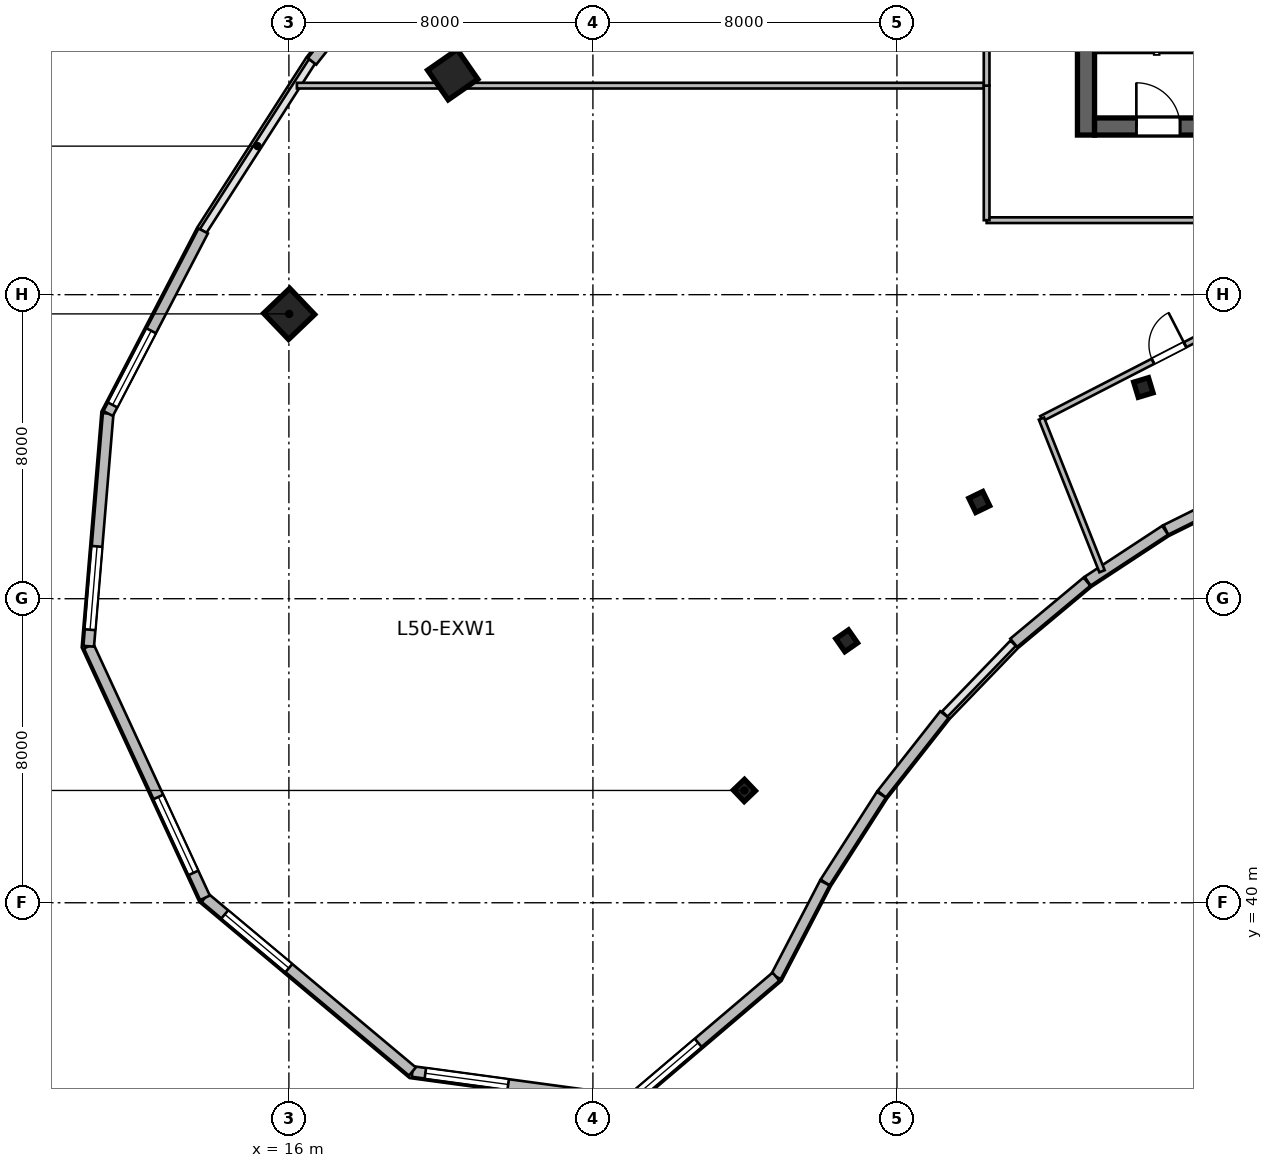
"""IFC4 building model, lengths in metres.
Left out: names, types, materials, properties, quantities, classifications, styles, units other than length and angle.
Written with IfcOpenShell. Run it as: python <this file> out.ifc"""

import sys

from ifc_helpers import new_model, si_unit, direction, frame, frame_2d, origin, origin_2d, place, context, subcontext, project, spatial, rectangle, i_section, extrude, source, transform, mapped, element, fill, save


model = new_model("IFC4")
c1 = context("Model", 3, precision=1e-05, world=origin(), true_north=direction((0.0, 1.0)))
c2 = subcontext(c1, "Body", "Model", "MODEL_VIEW")
j1 = project(units=[si_unit("LENGTHUNIT", "METRE"), si_unit("PLANEANGLEUNIT", "RADIAN")], contexts=[c1])
p1 = place(None, origin())
s1 = spatial("IfcSite", under=j1, at=p1, CompositionType="ELEMENT")
p2 = place(p1, origin())
s2 = spatial("IfcBuilding", under=s1, at=p2, CompositionType="ELEMENT")
p3 = place(p2, frame((0.0, 0.0, 207.9)))
s3 = spatial("IfcBuildingStorey", under=s2, at=p3, CompositionType="ELEMENT", Elevation=207.9)
m1 = source(origin(), c2, "Body", "SweptSolid", [
    extrude(rectangle(XDim=12.0, YDim=0.45, at=frame_2d((6.0, 0.0))), origin(), (0.0, 0.0, 1.0), 3.9),
])
p4 = place(p3, frame((36.975, 60.2, 0.0), z_axis=(0.0, 0.0, 1.0), x_axis=(0.0, 1.0, 0.0)))
e1 = element("IfcWall", 1, at=p4, inside=s3, PredefinedType="SHEAR", context=c2, shape_type="MappedRepresentation", body=[
    mapped(m1, transform((0.0, 0.0, 0.0), scale=1.0)),
])
m2 = source(origin(), c2, "Body", "SweptSolid", [
    extrude(rectangle(XDim=21.6, YDim=0.45, at=frame_2d((10.8, 0.0))), origin(), (0.0, 0.0, 1.0), 3.9),
])
p5 = place(p3, frame((37.2, 60.425, 0.0), z_axis=(0.0, 0.0, 1.0), x_axis=(1.0, 0.0, 0.0)))
e2 = element("IfcWall", 2, at=p5, inside=s3, PredefinedType="SHEAR", context=c2, shape_type="MappedRepresentation", body=[
    mapped(m2, transform((0.0, 0.0, 0.0), scale=1.0)),
])
p6 = place(p5, frame((1.1, 0.0, 0.0)))
e3 = element("IfcOpeningElement", 3, at=p6, cuts=e2, PredefinedType="OPENING", context=c2, shape_type="SweptSolid", body=[
    extrude(rectangle(XDim=1.15, YDim=2.15, at=frame_2d((0.575, 1.075))), frame((0.0, 0.235, 0.0), z_axis=(0.0, -1.0, 0.0), x_axis=(1.0, 0.0, 0.0)), (0.0, 0.0, 1.0), 0.47),
])
p7 = place(p5, frame((19.5, 0.0, 0.0)))
e4 = element("IfcOpeningElement", 4, at=p7, cuts=e2, PredefinedType="OPENING", context=c2, shape_type="SweptSolid", body=[
    extrude(rectangle(XDim=0.9, YDim=2.1, at=frame_2d((0.45, 1.05))), frame((0.0, 0.235, 0.0), z_axis=(0.0, -1.0, 0.0), x_axis=(1.0, 0.0, 0.0)), (0.0, 0.0, 1.0), 0.47),
])
p8 = place(p5, frame((12.02, 0.0, 0.0)))
e5 = element("IfcOpeningElement", 5, at=p8, cuts=e2, PredefinedType="OPENING", context=c2, shape_type="SweptSolid", body=[
    extrude(rectangle(XDim=1.6, YDim=2.15, at=frame_2d((0.8, 1.075))), frame((0.0, 0.235, 0.0), z_axis=(0.0, -1.0, 0.0), x_axis=(1.0, 0.0, 0.0)), (0.0, 0.0, 1.0), 0.47),
])
m3 = source(origin(), c2, "Body", "SweptSolid", [
    extrude(i_section(OverallWidth=0.406, OverallDepth=0.416, WebThickness=0.03, FlangeThickness=0.048, at=origin_2d()), origin(), (0.0, 0.0, 1.0), 3.9),
])
p9 = place(p3, frame((27.985, 42.955, 0.0), z_axis=(0.0, 0.0, 1.0), x_axis=(-0.690756218984, 0.723087716626, 0.0)))
e6 = element("IfcColumn", 6, at=p9, inside=s3, PredefinedType="COLUMN", context=c2, shape_type="MappedRepresentation", body=[
    mapped(m3, transform((0.0, 0.0, 0.0), scale=1.0)),
])
m4 = source(origin(), c2, "Body", "SweptSolid", [
    extrude(rectangle(XDim=0.95, YDim=0.95, at=origin_2d()), origin(), (0.0, 0.0, 1.0), 3.9),
])
p10 = place(p3, frame((16.007, 55.494, 0.0), z_axis=(0.0, 0.0, 1.0), x_axis=(-0.690756218984, 0.723087716626, 0.0)))
e7 = element("IfcColumn", 7, at=p10, inside=s3, PredefinedType="COLUMN", context=c2, shape_type="MappedRepresentation", body=[
    mapped(m4, transform((0.0, 0.0, 0.0), scale=1.0)),
])
p11 = place(p3, frame((30.677, 46.892, 0.0), z_axis=(0.0, 0.0, 1.0), x_axis=(-0.571143442153, 0.820850271661, 0.0)))
e8 = element("IfcColumn", 8, at=p11, inside=s3, PredefinedType="COLUMN", context=c2, shape_type="MappedRepresentation", body=[
    mapped(m3, transform((0.0, 0.0, 0.0), scale=1.0)),
])
p12 = place(p3, frame((20.311, 61.789, 0.0), z_axis=(0.0, 0.0, 1.0), x_axis=(-0.571143442153, 0.820850271661, 0.0)))
e9 = element("IfcColumn", 9, at=p12, inside=s3, PredefinedType="COLUMN", context=c2, shape_type="MappedRepresentation", body=[
    mapped(m4, transform((0.0, 0.0, 0.0), scale=1.0)),
])
for number, where, z_axis, x_axis in (
    (10, (34.166, 50.545, 0.0), (0.0, 0.0, 1.0), (-0.436, 0.9, 0.0)),
    (11, (38.485, 53.558, 0.0), (0.0, 0.0, 1.0), (-0.289, 0.957, 0.0)),
):
    element("IfcColumn", number, at=place(p3, frame(where, z_axis=z_axis, x_axis=x_axis)), inside=s3, PredefinedType="COLUMN", context=c2, shape_type="MappedRepresentation", body=[
        mapped(m3, transform((0.0, 0.0, 0.0), scale=1.0)),
    ])
m5 = source(origin(), c2, "Body", "SweptSolid", [
    extrude(rectangle(XDim=2.378, YDim=0.28, at=frame_2d((1.189, 0.0))), origin(), (0.0, 0.0, 1.0), 3.64),
])
p13 = place(p3, frame((41.207, 50.868, 0.0), z_axis=(0.0, 0.0, 1.0), x_axis=(-0.895941616831, -0.444171835252, 0.0)))
e12 = element("IfcWall", 12, at=p13, inside=s3, PredefinedType="SOLIDWALL", context=c2, shape_type="MappedRepresentation", body=[
    mapped(m5, transform((0.0, 0.0, 0.0), scale=1.0)),
])
m6 = source(origin(), c2, "Body", "SweptSolid", [
    extrude(rectangle(XDim=2.44, YDim=0.28, at=frame_2d((1.22, 0.0))), origin(), (0.0, 0.0, 1.0), 3.64),
])
p14 = place(p3, frame((39.057, 49.801, 0.0), z_axis=(0.0, 0.0, 1.0), x_axis=(-0.83598480459, -0.548752591333, 0.0)))
e13 = element("IfcWall", 13, at=p14, inside=s3, PredefinedType="SOLIDWALL", context=c2, shape_type="MappedRepresentation", body=[
    mapped(m6, transform((0.0, 0.0, 0.0), scale=1.0)),
])
m7 = source(origin(), c2, "Body", "SweptSolid", [
    extrude(rectangle(XDim=2.511, YDim=0.28, at=frame_2d((1.256, 0.0))), origin(), (0.0, 0.0, 1.0), 3.64),
])
p15 = place(p3, frame((37.001, 48.449, 0.0), z_axis=(0.0, 0.0, 1.0), x_axis=(-0.767910416122, -0.640557251782, 0.0)))
e14 = element("IfcWall", 14, at=p15, inside=s3, PredefinedType="SOLIDWALL", context=c2, shape_type="MappedRepresentation", body=[
    mapped(m7, transform((0.0, 0.0, 0.0), scale=1.0)),
])
m8 = source(origin(), c2, "Body", "SweptSolid", [
    extrude(rectangle(XDim=2.666, YDim=0.28, at=frame_2d((1.333, 0.0))), origin(), (0.0, 0.0, 1.0), 3.64),
])
p16 = place(p3, frame((33.249, 44.952, 0.0), z_axis=(0.0, 0.0, 1.0), x_axis=(-0.618161284122, -0.786051287648, 0.0)))
e15 = element("IfcWall", 15, at=p16, inside=s3, PredefinedType="SOLIDWALL", context=c2, shape_type="MappedRepresentation", body=[
    mapped(m8, transform((0.0, 0.0, 0.0), scale=1.0)),
])
m9 = source(origin(), c2, "Body", "SweptSolid", [
    extrude(rectangle(XDim=2.742, YDim=0.28, at=frame_2d((1.371, 0.0))), origin(), (0.0, 0.0, 1.0), 3.64),
])
p17 = place(p3, frame((31.591, 42.843, 0.0), z_axis=(0.0, 0.0, 1.0), x_axis=(-0.540172468355, -0.841554338371, 0.0)))
e16 = element("IfcWall", 16, at=p17, inside=s3, PredefinedType="SOLIDWALL", context=c2, shape_type="MappedRepresentation", body=[
    mapped(m9, transform((0.0, 0.0, 0.0), scale=1.0)),
])
m10 = source(origin(), c2, "Body", "SweptSolid", [
    extrude(rectangle(XDim=2.779, YDim=0.28, at=frame_2d((1.39, 0.0))), origin(), (0.0, 0.0, 1.0), 3.64),
])
p18 = place(p3, frame((30.101, 40.521, 0.0), z_axis=(0.0, 0.0, 1.0), x_axis=(-0.461770308601, -0.886999538948, 0.0)))
e17 = element("IfcWall", 17, at=p18, inside=s3, PredefinedType="SOLIDWALL", context=c2, shape_type="MappedRepresentation", body=[
    mapped(m10, transform((0.0, 0.0, 0.0), scale=1.0)),
])
m11 = source(origin(), c2, "Body", "SweptSolid", [
    extrude(rectangle(XDim=5.051, YDim=0.28, at=frame_2d((2.525, 0.0))), origin(), (0.0, 0.0, 1.0), 3.64),
])
p19 = place(p3, frame((28.818, 38.056, 0.0), z_axis=(0.0, 0.0, 1.0), x_axis=(-0.761904731537, -0.647689107568, 0.0)))
e18 = element("IfcWall", 18, at=p19, inside=s3, PredefinedType="SOLIDWALL", context=c2, shape_type="MappedRepresentation", body=[
    mapped(m11, transform((0.0, 0.0, 0.0), scale=1.0)),
])
p20 = place(p19, frame((2.688, 0.0, 0.95)))
e19 = element("IfcOpeningElement", 19, at=p20, cuts=e18, PredefinedType="OPENING", context=c2, shape_type="SweptSolid", body=[
    extrude(rectangle(XDim=2.2, YDim=2.1, at=frame_2d((1.1, 1.05))), frame((0.0, 0.15, 0.0), z_axis=(0.0, -1.0, 0.0), x_axis=(1.0, 0.0, 0.0)), (0.0, 0.0, 1.0), 0.3),
])
m12 = source(origin(), c2, "Body", "SweptSolid", [
    extrude(rectangle(XDim=5.771, YDim=0.28, at=frame_2d((2.886, 0.0))), origin(), (0.0, 0.0, 1.0), 3.64),
])
p21 = place(p3, frame((24.969, 34.784, 0.0), z_axis=(0.0, 0.0, 1.0), x_axis=(-0.990933615537, 0.134352408237, 0.0)))
e20 = element("IfcWall", 20, at=p21, inside=s3, PredefinedType="SOLIDWALL", context=c2, shape_type="MappedRepresentation", body=[
    mapped(m12, transform((0.0, 0.0, 0.0), scale=1.0)),
])
p22 = place(p21, frame((3.229, 0.0, 0.95)))
e21 = element("IfcOpeningElement", 21, at=p22, cuts=e20, PredefinedType="OPENING", context=c2, shape_type="SweptSolid", body=[
    extrude(rectangle(XDim=2.2, YDim=2.1, at=frame_2d((1.1, 1.05))), frame((0.0, 0.15, 0.0), z_axis=(0.0, -1.0, 0.0), x_axis=(1.0, 0.0, 0.0)), (0.0, 0.0, 1.0), 0.3),
])
m13 = source(origin(), c2, "Body", "SweptSolid", [
    extrude(rectangle(XDim=7.12, YDim=0.28, at=frame_2d((3.56, 0.0))), origin(), (0.0, 0.0, 1.0), 3.64),
])
p23 = place(p3, frame((19.25, 35.56, 0.0), z_axis=(0.0, 0.0, 1.0), x_axis=(-0.766709783564, 0.641993853387, 0.0)))
e22 = element("IfcWall", 22, at=p23, inside=s3, PredefinedType="SOLIDWALL", context=c2, shape_type="MappedRepresentation", body=[
    mapped(m13, transform((0.0, 0.0, 0.0), scale=1.0)),
])
p24 = place(p23, frame((4.24, 0.0, 0.95)))
e23 = element("IfcOpeningElement", 23, at=p24, cuts=e22, PredefinedType="OPENING", context=c2, shape_type="SweptSolid", body=[
    extrude(rectangle(XDim=2.2, YDim=2.1, at=frame_2d((1.1, 1.05))), frame((0.0, 0.15, 0.0), z_axis=(0.0, -1.0, 0.0), x_axis=(1.0, 0.0, 0.0)), (0.0, 0.0, 1.0), 0.3),
])
m14 = source(origin(), c2, "Body", "SweptSolid", [
    extrude(rectangle(XDim=7.292, YDim=0.28, at=frame_2d((3.646, 0.0))), origin(), (0.0, 0.0, 1.0), 3.64),
])
p25 = place(p3, frame((13.792, 40.131, 0.0), z_axis=(0.0, 0.0, 1.0), x_axis=(-0.419642001049, 0.907689699708, 0.0)))
e24 = element("IfcWall", 24, at=p25, inside=s3, PredefinedType="SOLIDWALL", context=c2, shape_type="MappedRepresentation", body=[
    mapped(m14, transform((0.0, 0.0, 0.0), scale=1.0)),
])
p26 = place(p25, frame((0.723, 0.0, 0.95)))
e25 = element("IfcOpeningElement", 25, at=p26, cuts=e24, PredefinedType="OPENING", context=c2, shape_type="SweptSolid", body=[
    extrude(rectangle(XDim=2.2, YDim=2.1, at=frame_2d((1.1, 1.05))), frame((0.0, 0.15, 0.0), z_axis=(0.0, -1.0, 0.0), x_axis=(1.0, 0.0, 0.0)), (0.0, 0.0, 1.0), 0.3),
])
m15 = source(origin(), c2, "Body", "SweptSolid", [
    extrude(rectangle(XDim=6.146, YDim=0.28, at=frame_2d((3.073, 0.0))), origin(), (0.0, 0.0, 1.0), 3.64),
])
p27 = place(p3, frame((10.732, 46.749, 0.0), z_axis=(0.0, 0.0, 1.0), x_axis=(0.083301904456, 0.996524356307, 0.0)))
e26 = element("IfcWall", 26, at=p27, inside=s3, PredefinedType="SOLIDWALL", context=c2, shape_type="MappedRepresentation", body=[
    mapped(m15, transform((0.0, 0.0, 0.0), scale=1.0)),
])
p28 = place(p27, frame((0.436, 0.0, 0.95)))
e27 = element("IfcOpeningElement", 27, at=p28, cuts=e26, PredefinedType="OPENING", context=c2, shape_type="SweptSolid", body=[
    extrude(rectangle(XDim=2.2, YDim=2.1, at=frame_2d((1.1, 1.05))), frame((0.0, 0.15, 0.0), z_axis=(0.0, -1.0, 0.0), x_axis=(1.0, 0.0, 0.0)), (0.0, 0.0, 1.0), 0.3),
])
m16 = source(origin(), c2, "Body", "SweptSolid", [
    extrude(rectangle(XDim=5.416, YDim=0.28, at=frame_2d((2.708, 0.0))), origin(), (0.0, 0.0, 1.0), 3.64),
])
p29 = place(p3, frame((11.244, 52.874, 0.0), z_axis=(0.0, 0.0, 1.0), x_axis=(0.46177852435, 0.886995261796, 0.0)))
e28 = element("IfcWall", 28, at=p29, inside=s3, PredefinedType="SOLIDWALL", context=c2, shape_type="MappedRepresentation", body=[
    mapped(m16, transform((0.0, 0.0, 0.0), scale=1.0)),
])
p30 = place(p29, frame((0.254, 0.0, 0.95)))
e29 = element("IfcOpeningElement", 29, at=p30, cuts=e28, PredefinedType="OPENING", context=c2, shape_type="SweptSolid", body=[
    extrude(rectangle(XDim=2.2, YDim=2.1, at=frame_2d((1.1, 1.05))), frame((0.0, 0.15, 0.0), z_axis=(0.0, -1.0, 0.0), x_axis=(1.0, 0.0, 0.0)), (0.0, 0.0, 1.0), 0.3),
])
m17 = source(origin(), c2, "Body", "SweptSolid", [
    extrude(rectangle(XDim=5.153, YDim=0.28, at=frame_2d((2.577, 0.0))), origin(), (0.0, 0.0, 1.0), 3.64),
])
p31 = place(p3, frame((16.609, 62.14, 0.0), z_axis=(0.0, 0.0, 1.0), x_axis=(0.618179283891, 0.786037132054, 0.0)))
e30 = element("IfcWall", 30, at=p31, inside=s3, PredefinedType="SOLIDWALL", context=c2, shape_type="MappedRepresentation", body=[
    mapped(m17, transform((0.0, 0.0, 0.0), scale=1.0)),
])
m18 = source(origin(), c2, "Body", "SweptSolid", [
    extrude(rectangle(XDim=6.648, YDim=0.15, at=frame_2d((3.324, 0.0))), origin(), (0.0, 0.0, 1.0), 3.64),
])
p32 = place(p3, frame((35.803, 52.738, 0.0), z_axis=(0.0, 0.0, 1.0), x_axis=(0.889264330224, 0.457393649925, 0.0)))
e31 = element("IfcWall", 31, at=p32, inside=s3, PredefinedType="PARTITIONING", context=c2, shape_type="MappedRepresentation", body=[
    mapped(m18, transform((0.0, 0.0, 0.0), scale=1.0)),
])
p33 = place(p32, frame((3.299, 0.0, 0.0)))
e32 = element("IfcOpeningElement", 32, at=p33, cuts=e31, PredefinedType="OPENING", context=c2, shape_type="SweptSolid", body=[
    extrude(rectangle(XDim=0.95, YDim=2.1, at=frame_2d((0.475, 1.05))), frame((0.0, 0.085, 0.0), z_axis=(0.0, -1.0, 0.0), x_axis=(1.0, 0.0, 0.0)), (0.0, 0.0, 1.0), 0.17),
])
m19 = source(origin(), c2, "Body", "SweptSolid", [
    extrude(rectangle(XDim=4.32, YDim=0.15, at=frame_2d((2.16, 0.0))), origin(), (0.0, 0.0, 1.0), 3.64),
])
p34 = place(p3, frame((37.396, 48.723, 0.0), z_axis=(0.0, 0.0, 1.0), x_axis=(-0.368846295269, 0.929490403644, 0.0)))
e33 = element("IfcWall", 33, at=p34, inside=s3, PredefinedType="PARTITIONING", context=c2, shape_type="MappedRepresentation", body=[
    mapped(m19, transform((0.0, 0.0, 0.0), scale=1.0)),
])
m20 = source(origin(), c2, "Body", "SweptSolid", [
    extrude(rectangle(XDim=12.39, YDim=0.15, at=frame_2d((6.195, 0.0))), origin(), (0.0, 0.0, 1.0), 3.64),
])
p35 = place(p3, frame((34.36, 57.96, 0.0), z_axis=(0.0, 0.0, 1.0), x_axis=(1.0, 0.0, 0.0)))
e34 = element("IfcWall", 34, at=p35, inside=s3, PredefinedType="PARTITIONING", context=c2, shape_type="MappedRepresentation", body=[
    mapped(m20, transform((0.0, 0.0, 0.0), scale=1.0)),
])
m21 = source(origin(), c2, "Body", "SweptSolid", [
    extrude(rectangle(XDim=18.15, YDim=0.15, at=frame_2d((9.075, 0.0))), origin(), (0.0, 0.0, 1.0), 3.64),
])
p36 = place(p3, frame((16.21, 61.5, 0.0), z_axis=(0.0, 0.0, 1.0), x_axis=(1.0, 0.0, 0.0)))
e35 = element("IfcWall", 35, at=p36, inside=s3, PredefinedType="PARTITIONING", context=c2, shape_type="MappedRepresentation", body=[
    mapped(m21, transform((0.0, 0.0, 0.0), scale=1.0)),
])
m22 = source(origin(), c2, "Body", "SweptSolid", [
    extrude(rectangle(XDim=3.54, YDim=0.15, at=frame_2d((1.77, 0.0))), origin(), (0.0, 0.0, 1.0), 3.64),
])
p37 = place(p3, frame((34.36, 57.96, 0.0), z_axis=(0.0, 0.0, 1.0), x_axis=(0.0, 1.0, 0.0)))
e36 = element("IfcWall", 36, at=p37, inside=s3, PredefinedType="PARTITIONING", context=c2, shape_type="MappedRepresentation", body=[
    mapped(m22, transform((0.0, 0.0, 0.0), scale=1.0)),
])
m23 = source(origin(), c2, "Body", "SweptSolid", [
    extrude(rectangle(XDim=4.7, YDim=0.15, at=frame_2d((2.35, 0.0))), origin(), (0.0, 0.0, 1.0), 3.64),
])
p38 = place(p3, frame((34.36, 61.5, 0.0), z_axis=(0.0, 0.0, 1.0), x_axis=(0.0, 1.0, 0.0)))
e37 = element("IfcWall", 37, at=p38, inside=s3, PredefinedType="PARTITIONING", context=c2, shape_type="MappedRepresentation", body=[
    mapped(m23, transform((0.0, 0.0, 0.0), scale=1.0)),
])
p39 = place(p38, frame((1.875, 0.0, 0.0)))
e38 = element("IfcOpeningElement", 38, at=p39, cuts=e37, PredefinedType="OPENING", context=c2, shape_type="SweptSolid", body=[
    extrude(rectangle(XDim=0.95, YDim=2.1, at=frame_2d((0.475, 1.05))), frame((0.0, 0.085, 0.0), z_axis=(0.0, -1.0, 0.0), x_axis=(1.0, 0.0, 0.0)), (0.0, 0.0, 1.0), 0.17),
])
m24 = source(origin(), c2, "Body", "SweptSolid", [
    extrude(rectangle(XDim=2.2, YDim=2.1, at=frame_2d((1.1, 1.05))), frame((0.0, 0.03, 0.0), z_axis=(0.0, -1.0, 0.0), x_axis=(1.0, 0.0, 0.0)), (0.0, 0.0, 1.0), 0.06),
])
p40 = place(p20, origin())
e39 = element("IfcWindow", 39, at=p40, inside=s3, PartitioningType="TRIPLE_PANEL_VERTICAL", PredefinedType="WINDOW", context=c2, shape_type="MappedRepresentation", body=[
    mapped(m24, transform((0.0, 0.0, 0.0), scale=1.0)),
])
fill(e19, e39)
p41 = place(p22, origin())
e40 = element("IfcWindow", 40, at=p41, inside=s3, PartitioningType="TRIPLE_PANEL_VERTICAL", PredefinedType="WINDOW", context=c2, shape_type="MappedRepresentation", body=[
    mapped(m24, transform((0.0, 0.0, 0.0), scale=1.0)),
])
fill(e21, e40)
p42 = place(p24, origin())
e41 = element("IfcWindow", 41, at=p42, inside=s3, PartitioningType="TRIPLE_PANEL_VERTICAL", PredefinedType="WINDOW", context=c2, shape_type="MappedRepresentation", body=[
    mapped(m24, transform((0.0, 0.0, 0.0), scale=1.0)),
])
fill(e23, e41)
p43 = place(p26, origin())
e42 = element("IfcWindow", 42, at=p43, inside=s3, PartitioningType="TRIPLE_PANEL_VERTICAL", PredefinedType="WINDOW", context=c2, shape_type="MappedRepresentation", body=[
    mapped(m24, transform((0.0, 0.0, 0.0), scale=1.0)),
])
fill(e25, e42)
p44 = place(p28, origin())
e43 = element("IfcWindow", 43, at=p44, inside=s3, PartitioningType="TRIPLE_PANEL_VERTICAL", PredefinedType="WINDOW", context=c2, shape_type="MappedRepresentation", body=[
    mapped(m24, transform((0.0, 0.0, 0.0), scale=1.0)),
])
fill(e27, e43)
p45 = place(p30, origin())
e44 = element("IfcWindow", 44, at=p45, inside=s3, PartitioningType="TRIPLE_PANEL_VERTICAL", PredefinedType="WINDOW", context=c2, shape_type="MappedRepresentation", body=[
    mapped(m24, transform((0.0, 0.0, 0.0), scale=1.0)),
])
fill(e29, e44)
m25 = source(origin(), c2, "Body", "SweptSolid", [
    extrude(rectangle(XDim=1.15, YDim=2.15, at=frame_2d((0.575, 1.075))), frame((0.0, 0.025, 0.0), z_axis=(0.0, -1.0, 0.0), x_axis=(1.0, 0.0, 0.0)), (0.0, 0.0, 1.0), 0.05),
])
p46 = place(p6, origin())
e45 = element("IfcDoor", 45, at=p46, inside=s3, OperationType="SINGLE_SWING_LEFT", PredefinedType="DOOR", context=c2, shape_type="MappedRepresentation", body=[
    mapped(m25, transform((0.0, 0.0, 0.0), scale=1.0)),
])
fill(e3, e45)
m26 = source(origin(), c2, "Body", "SweptSolid", [
    extrude(rectangle(XDim=0.95, YDim=2.1, at=frame_2d((0.475, 1.05))), frame((0.0, 0.025, 0.0), z_axis=(0.0, -1.0, 0.0), x_axis=(1.0, 0.0, 0.0)), (0.0, 0.0, 1.0), 0.05),
])
p47 = place(p33, origin())
e46 = element("IfcDoor", 46, at=p47, inside=s3, OperationType="SINGLE_SWING_RIGHT", PredefinedType="DOOR", context=c2, shape_type="MappedRepresentation", body=[
    mapped(m26, transform((0.0, 0.0, 0.0), scale=1.0)),
])
fill(e32, e46)
save(model, sys.argv[1])
